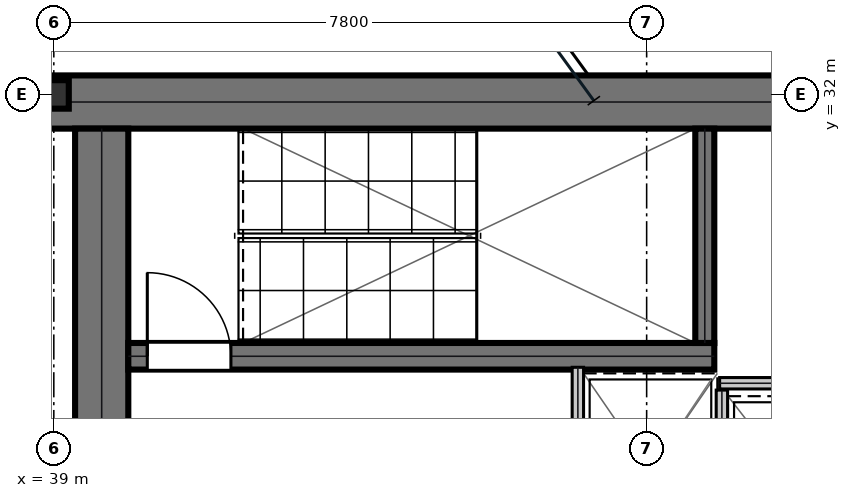
"""IFC4 building model, lengths in metres.
Left out: names, types, materials, properties, quantities, classifications, styles, units other than length and angle.
Written with IfcOpenShell. Run it as: python <this file> out.ifc"""

import sys

from ifc_helpers import new_model, si_unit, direction, frame, frame_2d, origin, origin_2d, place, context, subcontext, project, spatial, rectangle, i_section, extrude, element, fill, save


model = new_model("IFC4")
c1 = context("Model", 3, precision=1e-05, world=origin(), true_north=direction((0.0, 1.0)))
c2 = subcontext(c1, "Body", "Model", "MODEL_VIEW")
j1 = project(units=[si_unit("LENGTHUNIT", "METRE"), si_unit("PLANEANGLEUNIT", "RADIAN")], contexts=[c1])
p1 = place(None, origin())
s1 = spatial("IfcSite", under=j1, at=p1, CompositionType="ELEMENT")
p2 = place(p1, origin())
s2 = spatial("IfcBuilding", under=s1, at=p2, CompositionType="ELEMENT")
p3 = place(p2, frame((0.0, 0.0, 232.35)))
s3 = spatial("IfcBuildingStorey", under=s2, at=p3, CompositionType="ELEMENT", Elevation=232.35)
p4 = place(p3, frame((38.8, 31.9, 0.0), z_axis=(0.0, 0.0, 1.0), x_axis=(1.0, 0.0, 0.0)))
e1 = element("IfcWall", 1, at=p4, inside=s3, PredefinedType="SHEAR", context=c2, shape_type="SweptSolid", body=[
    extrude(rectangle(XDim=16.0, YDim=0.7, at=frame_2d((8.0, 0.0))), origin(), (0.0, 0.0, 1.0), 3.79),
])
p5 = place(p3, frame((39.63, 25.4, 0.0), z_axis=(0.0, 0.0, 1.0), x_axis=(0.0, 1.0, 0.0)))
e2 = element("IfcWall", 2, at=p5, inside=s3, PredefinedType="SHEAR", context=c2, shape_type="SweptSolid", body=[
    extrude(rectangle(XDim=6.15, YDim=0.7, at=frame_2d((3.075, 0.0))), origin(), (0.0, 0.0, 1.0), 3.79),
])
p6 = place(p3, frame((39.98, 28.555, 0.0), z_axis=(0.0, 0.0, 1.0), x_axis=(1.0, 0.0, 0.0)))
e3 = element("IfcWall", 3, at=p6, inside=s3, PredefinedType="SHEAR", context=c2, shape_type="SweptSolid", body=[
    extrude(rectangle(XDim=7.71, YDim=0.35, at=frame_2d((3.855, 0.0))), origin(), (0.0, 0.0, 1.0), 3.79),
])
p7 = place(p6, frame((0.25, 0.0, 0.0)))
e4 = element("IfcOpeningElement", 4, at=p7, cuts=e3, PredefinedType="OPENING", context=c2, shape_type="SweptSolid", body=[
    extrude(rectangle(XDim=1.1, YDim=2.15, at=frame_2d((0.55, 1.075))), frame((0.0, 0.185, 0.0), z_axis=(0.0, -1.0, 0.0), x_axis=(1.0, 0.0, 0.0)), (0.0, 0.0, 1.0), 0.37),
])
p8 = place(p3, frame((47.565, 28.73, 0.0), z_axis=(0.0, 0.0, 1.0), x_axis=(0.0, 1.0, 0.0)))
e5 = element("IfcWall", 5, at=p8, inside=s3, PredefinedType="SHEAR", context=c2, shape_type="SweptSolid", body=[
    extrude(rectangle(XDim=2.82, YDim=0.25, at=frame_2d((1.41, 0.0))), origin(), (0.0, 0.0, 1.0), 3.79),
])
p9 = place(p3, frame((39.0, 32.0, 0.0), z_axis=(0.0, 0.0, 1.0), x_axis=(1.0, 0.0, 0.0)))
e6 = element("IfcColumn", 6, at=p9, inside=s3, PredefinedType="COLUMN", context=c2, shape_type="SweptSolid", body=[
    extrude(i_section(OverallWidth=0.394, OverallDepth=0.375, WebThickness=0.017, FlangeThickness=0.028, at=origin_2d()), origin(), (0.0, 0.0, 1.0), 4.044),
])
p10 = place(p3, frame((45.895, 25.69, 0.0), z_axis=(0.0, 0.0, 1.0), x_axis=(0.0, 1.0, 0.0)))
e7 = element("IfcWall", 7, at=p10, inside=s3, PredefinedType="PARTITIONING", context=c2, shape_type="SweptSolid", body=[
    extrude(rectangle(XDim=2.72, YDim=0.15, at=frame_2d((1.36, 0.0))), origin(), (0.0, 0.0, 1.0), 3.79),
])
p11 = place(p10, frame((0.81, 0.0, 0.0)))
e8 = element("IfcOpeningElement", 8, at=p11, cuts=e7, PredefinedType="OPENING", context=c2, shape_type="SweptSolid", body=[
    extrude(rectangle(XDim=1.1, YDim=2.15, at=frame_2d((0.55, 1.075))), frame((0.0, 0.085, 0.0), z_axis=(0.0, -1.0, 0.0), x_axis=(1.0, 0.0, 0.0)), (0.0, 0.0, 1.0), 0.17),
])
p12 = place(p3, frame((47.79, 25.695, 0.0), z_axis=(0.0, 0.0, 1.0), x_axis=(0.0, 1.0, 0.0)))
e9 = element("IfcWall", 9, at=p12, inside=s3, PredefinedType="PARTITIONING", context=c2, shape_type="SweptSolid", body=[
    extrude(rectangle(XDim=2.415, YDim=0.15, at=frame_2d((1.208, 0.0))), origin(), (0.0, 0.0, 1.0), 3.79),
])
p13 = place(p3, frame((47.76, 28.2, 0.0), z_axis=(0.0, 0.0, 1.0), x_axis=(1.0, 0.0, 0.0)))
e10 = element("IfcWall", 10, at=p13, inside=s3, PredefinedType="PARTITIONING", context=c2, shape_type="SweptSolid", body=[
    extrude(rectangle(XDim=2.04, YDim=0.15, at=frame_2d((1.02, 0.0))), origin(), (0.0, 0.0, 1.0), 3.79),
])
p14 = place(p7, origin())
e11 = element("IfcDoor", 11, at=p14, inside=s3, OperationType="SINGLE_SWING_LEFT", PredefinedType="DOOR", context=c2, shape_type="SweptSolid", body=[
    extrude(rectangle(XDim=1.1, YDim=2.15, at=frame_2d((0.55, 1.075))), frame((0.0, 0.025, 0.0), z_axis=(0.0, -1.0, 0.0), x_axis=(1.0, 0.0, 0.0)), (0.0, 0.0, 1.0), 0.05),
])
fill(e4, e11)
save(model, sys.argv[1])
